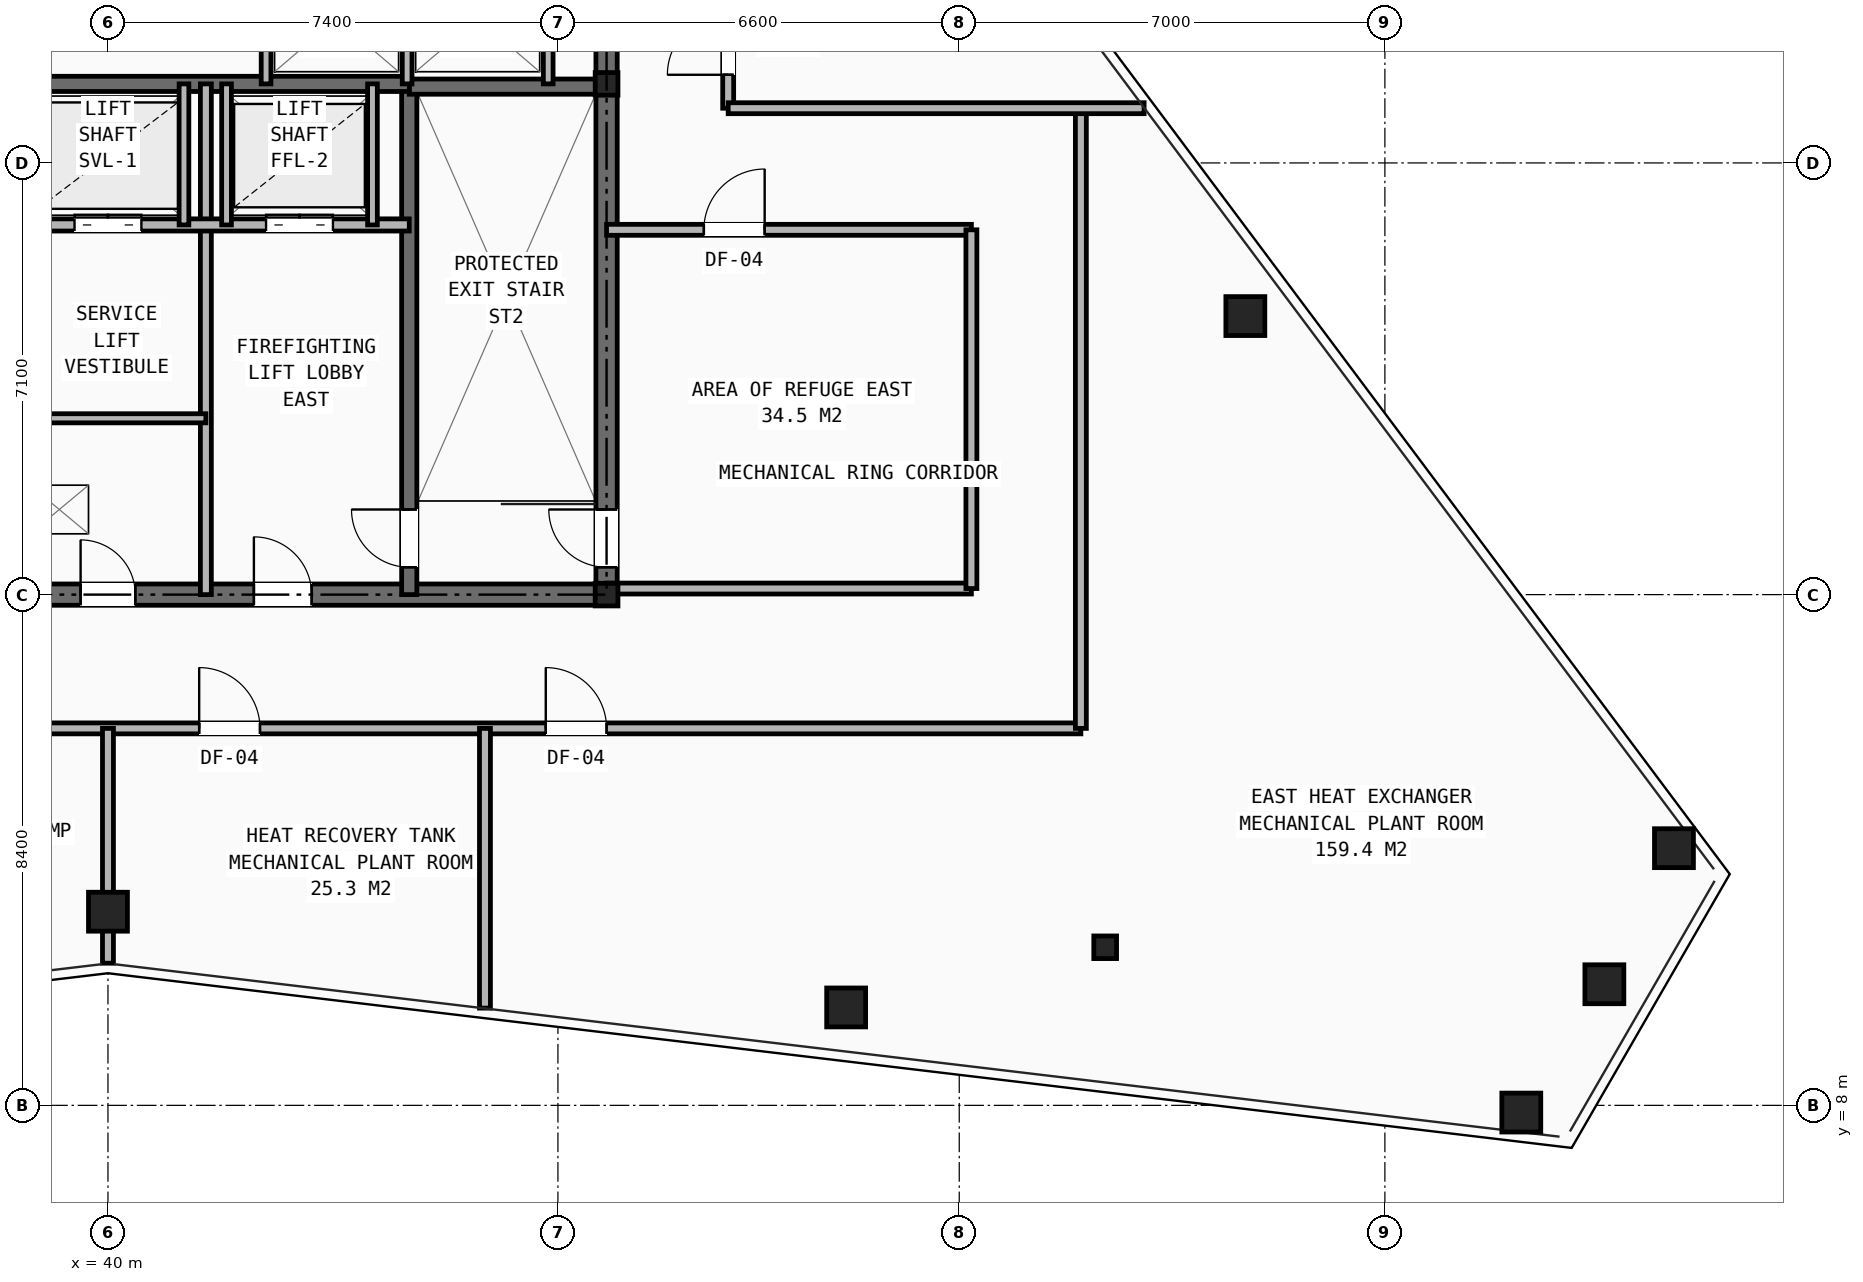
"""IFC4 building model, lengths in metres.
Left out: names, types, materials, properties, quantities, classifications, styles, units other than length and angle.
Written with IfcOpenShell. Run it as: python <this file> out.ifc"""

import sys

from ifc_helpers import new_model, si_unit, direction, frame, frame_2d, origin, origin_2d, place, context, subcontext, project, spatial, rectangle, hollow_rectangle, i_section, extrude, element, fill, save


model = new_model("IFC4")
c1 = context("Model", 3, precision=1e-05, world=origin(), true_north=direction((0.0, 1.0)))
c2 = subcontext(c1, "Body", "Model", "MODEL_VIEW")
j1 = project(units=[si_unit("LENGTHUNIT", "METRE"), si_unit("PLANEANGLEUNIT", "RADIAN")], contexts=[c1])
p1 = place(None, origin())
s1 = spatial("IfcSite", under=j1, at=p1, CompositionType="ELEMENT")
p2 = place(p1, origin())
s2 = spatial("IfcBuilding", under=s1, at=p2, CompositionType="ELEMENT")
p3 = place(p2, frame((0.0, 0.0, 290.0)))
s3 = spatial("IfcBuildingStorey", under=s2, at=p3, CompositionType="ELEMENT", Elevation=290.0)
for number, where, z_axis, x_axis in (
    (1, (48.2, 16.4, 0.0), (0.0, 0.0, 1.0), (1.0, 0.0, 0.0)),
    (2, (48.2, 24.8, 0.0), (0.0, 0.0, 1.0), (1.0, 0.0, 0.0)),
    (3, (56.4, 10.6, 0.0), (0.0, 0.0, 1.0), (1.0, 0.0, 0.0)),
):
    element("IfcColumn", number, at=place(p3, frame(where, z_axis=z_axis, x_axis=x_axis)), inside=s3, PredefinedType="COLUMN", context=c2, shape_type="SweptSolid", body=[
        extrude(i_section(OverallWidth=0.374, OverallDepth=0.372, WebThickness=0.016, FlangeThickness=0.026, at=origin_2d()), origin(), (0.0, 0.0, 1.0), 4.8),
    ])
for number, where, z_axis, x_axis in (
    (4, (40.0, 11.185, 0.0), (0.0, 0.0, 1.0), (1.0, 0.0, 0.0)),
    (5, (52.14, 9.61, 0.0), (0.0, 0.0, 1.0), (1.0, 0.0, 0.0)),
    (6, (63.243, 7.882, 0.0), (0.0, 0.0, 1.0), (1.0, 0.0, 0.0)),
    (7, (64.61, 9.992, 0.0), (0.0, 0.0, 1.0), (1.0, 0.0, 0.0)),
    (8, (65.754, 12.23, 0.0), (0.0, 0.0, 1.0), (1.0, 0.0, 0.0)),
    (9, (58.705, 20.981, 0.0), (0.0, 0.0, 1.0), (1.0, 0.0, 0.0)),
):
    element("IfcColumn", number, at=place(p3, frame(where, z_axis=z_axis, x_axis=x_axis)), inside=s3, PredefinedType="COLUMN", context=c2, shape_type="SweptSolid", body=[
        extrude(hollow_rectangle(XDim=0.64, YDim=0.64, WallThickness=0.045, at=origin_2d()), origin(), (0.0, 0.0, 1.0), 4.8),
    ])
p4 = place(p3, frame((31.8, 16.4, 0.0), z_axis=(0.0, 0.0, 1.0), x_axis=(1.0, 0.0, 0.0)))
e10 = element("IfcWall", 10, at=p4, inside=s3, PredefinedType="SHEAR", context=c2, shape_type="SweptSolid", body=[
    extrude(rectangle(XDim=16.4, YDim=0.35, at=frame_2d((8.2, 0.0))), origin(), (0.0, 0.0, 1.0), 4.54),
])
p5 = place(p4, frame((7.75, 0.0, 0.0)))
e11 = element("IfcOpeningElement", 11, at=p5, cuts=e10, PredefinedType="OPENING", context=c2, shape_type="SweptSolid", body=[
    extrude(rectangle(XDim=0.9, YDim=2.1, at=frame_2d((0.45, 1.05))), frame((0.0, 0.185, 0.0), z_axis=(0.0, -1.0, 0.0), x_axis=(1.0, 0.0, 0.0)), (0.0, 0.0, 1.0), 0.37),
])
p6 = place(p4, frame((4.2, 0.0, 0.0)))
e12 = element("IfcOpeningElement", 12, at=p6, cuts=e10, PredefinedType="OPENING", context=c2, shape_type="SweptSolid", body=[
    extrude(rectangle(XDim=0.95, YDim=2.1, at=frame_2d((0.475, 1.05))), frame((0.0, 0.185, 0.0), z_axis=(0.0, -1.0, 0.0), x_axis=(1.0, 0.0, 0.0)), (0.0, 0.0, 1.0), 0.37),
])
p7 = place(p4, frame((10.6, 0.0, 0.0)))
e13 = element("IfcOpeningElement", 13, at=p7, cuts=e10, PredefinedType="OPENING", context=c2, shape_type="SweptSolid", body=[
    extrude(rectangle(XDim=0.95, YDim=2.1, at=frame_2d((0.475, 1.05))), frame((0.0, 0.185, 0.0), z_axis=(0.0, -1.0, 0.0), x_axis=(1.0, 0.0, 0.0)), (0.0, 0.0, 1.0), 0.37),
])
p8 = place(p3, frame((48.2, 16.4, 0.0), z_axis=(0.0, 0.0, 1.0), x_axis=(0.0, 1.0, 0.0)))
e14 = element("IfcWall", 14, at=p8, inside=s3, PredefinedType="SHEAR", context=c2, shape_type="SweptSolid", body=[
    extrude(rectangle(XDim=14.8, YDim=0.35, at=frame_2d((7.4, 0.0))), origin(), (0.0, 0.0, 1.0), 4.54),
])
p9 = place(p8, frame((11.0, 0.0, 0.0)))
e15 = element("IfcOpeningElement", 15, at=p9, cuts=e14, PredefinedType="OPENING", context=c2, shape_type="SweptSolid", body=[
    extrude(rectangle(XDim=1.1, YDim=2.15, at=frame_2d((0.55, 1.075))), frame((0.0, 0.185, 0.0), z_axis=(0.0, -1.0, 0.0), x_axis=(1.0, 0.0, 0.0)), (0.0, 0.0, 1.0), 0.37),
])
p10 = place(p8, frame((0.45, 0.0, 0.0)))
e16 = element("IfcOpeningElement", 16, at=p10, cuts=e14, PredefinedType="OPENING", context=c2, shape_type="SweptSolid", body=[
    extrude(rectangle(XDim=0.95, YDim=2.1, at=frame_2d((0.475, 1.05))), frame((0.0, 0.185, 0.0), z_axis=(0.0, -1.0, 0.0), x_axis=(1.0, 0.0, 0.0)), (0.0, 0.0, 1.0), 0.37),
])
p11 = place(p3, frame((44.955, 16.4, 0.0), z_axis=(0.0, 0.0, 1.0), x_axis=(0.0, 1.0, 0.0)))
e17 = element("IfcWall", 17, at=p11, inside=s3, PredefinedType="SHEAR", context=c2, shape_type="SweptSolid", body=[
    extrude(rectangle(XDim=8.4, YDim=0.25, at=frame_2d((4.2, 0.0))), origin(), (0.0, 0.0, 1.0), 4.54),
])
p12 = place(p11, frame((0.45, 0.0, 0.0)))
e18 = element("IfcOpeningElement", 18, at=p12, cuts=e17, PredefinedType="OPENING", context=c2, shape_type="SweptSolid", body=[
    extrude(rectangle(XDim=0.95, YDim=2.1, at=frame_2d((0.475, 1.05))), frame((0.0, 0.135, 0.0), z_axis=(0.0, -1.0, 0.0), x_axis=(1.0, 0.0, 0.0)), (0.0, 0.0, 1.0), 0.27),
])
p13 = place(p3, frame((44.955, 24.755, 0.0), z_axis=(0.0, 0.0, 1.0), x_axis=(1.0, 0.0, 0.0)))
e19 = element("IfcWall", 19, at=p13, inside=s3, PredefinedType="SHEAR", context=c2, shape_type="SweptSolid", body=[
    extrude(rectangle(XDim=3.245, YDim=0.25, at=frame_2d((1.623, 0.0))), origin(), (0.0, 0.0, 1.0), 4.54),
])
p14 = place(p3, frame((35.045, 24.8, 0.0), z_axis=(0.0, 0.0, 1.0), x_axis=(1.0, 0.0, 0.0)))
e20 = element("IfcWall", 20, at=p14, inside=s3, PredefinedType="SHEAR", context=c2, shape_type="SweptSolid", body=[
    extrude(rectangle(XDim=9.91, YDim=0.25, at=frame_2d((4.955, 0.0))), origin(), (0.0, 0.0, 1.0), 4.54),
])
p15 = place(p3, frame((41.61, 16.4, 0.0), z_axis=(0.0, 0.0, 1.0), x_axis=(0.0, 1.0, 0.0)))
e21 = element("IfcWall", 21, at=p15, inside=s3, PredefinedType="PARTITIONING", context=c2, shape_type="SweptSolid", body=[
    extrude(rectangle(XDim=8.4, YDim=0.18, at=frame_2d((4.2, 0.0))), origin(), (0.0, 0.0, 1.0), 3.995),
])
p16 = place(p3, frame((35.045, 22.48, 0.0), z_axis=(0.0, 0.0, 1.0), x_axis=(1.0, 0.0, 0.0)))
e22 = element("IfcWall", 22, at=p16, inside=s3, PredefinedType="SOLIDWALL", context=c2, shape_type="SweptSolid", body=[
    extrude(rectangle(XDim=9.91, YDim=0.2, at=frame_2d((4.955, 0.0))), origin(), (0.0, 0.0, 1.0), 4.54),
])
p17 = place(p16, frame((1.255, 0.0, 0.0)))
e23 = element("IfcOpeningElement", 23, at=p17, cuts=e22, PredefinedType="OPENING", context=c2, shape_type="SweptSolid", body=[
    extrude(rectangle(XDim=1.1, YDim=2.15, at=frame_2d((0.55, 1.075))), frame((0.0, 0.11, 0.0), z_axis=(0.0, -1.0, 0.0), x_axis=(1.0, 0.0, 0.0)), (0.0, 0.0, 1.0), 0.22),
])
p18 = place(p16, frame((7.555, 0.0, 0.0)))
e24 = element("IfcOpeningElement", 24, at=p18, cuts=e22, PredefinedType="OPENING", context=c2, shape_type="SweptSolid", body=[
    extrude(rectangle(XDim=1.1, YDim=2.15, at=frame_2d((0.55, 1.075))), frame((0.0, 0.11, 0.0), z_axis=(0.0, -1.0, 0.0), x_axis=(1.0, 0.0, 0.0)), (0.0, 0.0, 1.0), 0.22),
])
p19 = place(p16, frame((4.405, 0.0, 0.0)))
e25 = element("IfcOpeningElement", 25, at=p19, cuts=e22, PredefinedType="OPENING", context=c2, shape_type="SweptSolid", body=[
    extrude(rectangle(XDim=1.1, YDim=2.15, at=frame_2d((0.55, 1.075))), frame((0.0, 0.11, 0.0), z_axis=(0.0, -1.0, 0.0), x_axis=(1.0, 0.0, 0.0)), (0.0, 0.0, 1.0), 0.22),
])
p20 = place(p3, frame((38.39, 19.3, 0.0), z_axis=(0.0, 0.0, 1.0), x_axis=(1.0, 0.0, 0.0)))
e26 = element("IfcWall", 26, at=p20, inside=s3, PredefinedType="PARTITIONING", context=c2, shape_type="SweptSolid", body=[
    extrude(rectangle(XDim=3.22, YDim=0.15, at=frame_2d((1.61, 0.0))), origin(), (0.0, 0.0, 1.0), 4.54),
])
for number, where, z_axis, x_axis in (
    (27, (41.95, 22.48, 0.0), (0.0, 0.0, 1.0), (0.0, 1.0, 0.0)),
    (28, (44.35, 22.48, 0.0), (0.0, 0.0, 1.0), (0.0, 1.0, 0.0)),
    (29, (41.25, 22.48, 0.0), (0.0, 0.0, 1.0), (0.0, 1.0, 0.0)),
):
    element("IfcWall", number, at=place(p3, frame(where, z_axis=z_axis, x_axis=x_axis)), inside=s3, PredefinedType="SOLIDWALL", context=c2, shape_type="SweptSolid", body=[
        extrude(rectangle(XDim=2.32, YDim=0.16, at=frame_2d((1.16, 0.0))), origin(), (0.0, 0.0, 1.0), 4.54),
    ])
for number, where, z_axis, x_axis in (
    (30, (42.6, 24.8, 0.0), (0.0, 0.0, 1.0), (0.0, 1.0, 0.0)),
    (31, (44.92, 24.8, 0.0), (0.0, 0.0, 1.0), (0.0, 1.0, 0.0)),
    (32, (47.24, 24.8, 0.0), (0.0, 0.0, 1.0), (0.0, 1.0, 0.0)),
):
    element("IfcWall", number, at=place(p3, frame(where, z_axis=z_axis, x_axis=x_axis)), inside=s3, PredefinedType="SOLIDWALL", context=c2, shape_type="SweptSolid", body=[
        extrude(rectangle(XDim=2.08, YDim=0.16, at=frame_2d((1.04, 0.0))), origin(), (0.0, 0.0, 1.0), 4.54),
    ])
p21 = place(p3, frame((24.0, 14.2, 0.0), z_axis=(0.0, 0.0, 1.0), x_axis=(1.0, 0.0, 0.0)))
e33 = element("IfcWall", 33, at=p21, inside=s3, PredefinedType="PARTITIONING", context=c2, shape_type="SweptSolid", body=[
    extrude(rectangle(XDim=32.0, YDim=0.18, at=frame_2d((16.0, 0.0))), origin(), (0.0, 0.0, 1.0), 3.582),
])
p22 = place(p21, frame((7.2, 0.0, 0.0)))
e34 = element("IfcOpeningElement", 34, at=p22, cuts=e33, PredefinedType="OPENING", context=c2, shape_type="SweptSolid", body=[
    extrude(rectangle(XDim=1.0, YDim=2.15, at=frame_2d((0.5, 1.075))), frame((0.0, 0.1, 0.0), z_axis=(0.0, -1.0, 0.0), x_axis=(1.0, 0.0, 0.0)), (0.0, 0.0, 1.0), 0.2),
])
p23 = place(p21, frame((11.2, 0.0, 0.0)))
e35 = element("IfcOpeningElement", 35, at=p23, cuts=e33, PredefinedType="OPENING", context=c2, shape_type="SweptSolid", body=[
    extrude(rectangle(XDim=1.0, YDim=2.15, at=frame_2d((0.5, 1.075))), frame((0.0, 0.1, 0.0), z_axis=(0.0, -1.0, 0.0), x_axis=(1.0, 0.0, 0.0)), (0.0, 0.0, 1.0), 0.2),
])
p24 = place(p21, frame((17.5, 0.0, 0.0)))
e36 = element("IfcOpeningElement", 36, at=p24, cuts=e33, PredefinedType="OPENING", context=c2, shape_type="SweptSolid", body=[
    extrude(rectangle(XDim=1.0, YDim=2.15, at=frame_2d((0.5, 1.075))), frame((0.0, 0.1, 0.0), z_axis=(0.0, -1.0, 0.0), x_axis=(1.0, 0.0, 0.0)), (0.0, 0.0, 1.0), 0.2),
])
p25 = place(p21, frame((23.2, 0.0, 0.0)))
e37 = element("IfcOpeningElement", 37, at=p25, cuts=e33, PredefinedType="OPENING", context=c2, shape_type="SweptSolid", body=[
    extrude(rectangle(XDim=1.0, YDim=2.15, at=frame_2d((0.5, 1.075))), frame((0.0, 0.1, 0.0), z_axis=(0.0, -1.0, 0.0), x_axis=(1.0, 0.0, 0.0)), (0.0, 0.0, 1.0), 0.2),
])
p26 = place(p3, frame((50.2, 24.4, 0.0), z_axis=(0.0, 0.0, 1.0), x_axis=(0.0, 1.0, 0.0)))
e38 = element("IfcWall", 38, at=p26, inside=s3, PredefinedType="PARTITIONING", context=c2, shape_type="SweptSolid", body=[
    extrude(rectangle(XDim=8.6, YDim=0.18, at=frame_2d((4.3, 0.0))), origin(), (0.0, 0.0, 1.0), 3.582),
])
p27 = place(p26, frame((0.55, 0.0, 0.0)))
e39 = element("IfcOpeningElement", 39, at=p27, cuts=e38, PredefinedType="OPENING", context=c2, shape_type="SweptSolid", body=[
    extrude(rectangle(XDim=1.0, YDim=2.15, at=frame_2d((0.5, 1.075))), frame((0.0, 0.1, 0.0), z_axis=(0.0, -1.0, 0.0), x_axis=(1.0, 0.0, 0.0)), (0.0, 0.0, 1.0), 0.2),
])
p28 = place(p3, frame((56.0, 14.2, 0.0), z_axis=(0.0, 0.0, 1.0), x_axis=(0.0, 1.0, 0.0)))
e40 = element("IfcWall", 40, at=p28, inside=s3, PredefinedType="PARTITIONING", context=c2, shape_type="SweptSolid", body=[
    extrude(rectangle(XDim=10.2, YDim=0.18, at=frame_2d((5.1, 0.0))), origin(), (0.0, 0.0, 1.0), 3.918),
])
p29 = place(p3, frame((48.2, 16.5, 0.0), z_axis=(0.0, 0.0, 1.0), x_axis=(1.0, 0.0, 0.0)))
e41 = element("IfcWall", 41, at=p29, inside=s3, PredefinedType="PARTITIONING", context=c2, shape_type="SweptSolid", body=[
    extrude(rectangle(XDim=6.0, YDim=0.18, at=frame_2d((3.0, 0.0))), origin(), (0.0, 0.0, 1.0), 3.995),
])
p30 = place(p3, frame((48.2, 22.4, 0.0), z_axis=(0.0, 0.0, 1.0), x_axis=(1.0, 0.0, 0.0)))
e42 = element("IfcWall", 42, at=p30, inside=s3, PredefinedType="PARTITIONING", context=c2, shape_type="SweptSolid", body=[
    extrude(rectangle(XDim=6.0, YDim=0.18, at=frame_2d((3.0, 0.0))), origin(), (0.0, 0.0, 1.0), 3.995),
])
p31 = place(p30, frame((1.6, 0.0, 0.0)))
e43 = element("IfcOpeningElement", 43, at=p31, cuts=e42, PredefinedType="OPENING", context=c2, shape_type="SweptSolid", body=[
    extrude(rectangle(XDim=1.0, YDim=2.15, at=frame_2d((0.5, 1.075))), frame((0.0, 0.1, 0.0), z_axis=(0.0, -1.0, 0.0), x_axis=(1.0, 0.0, 0.0)), (0.0, 0.0, 1.0), 0.2),
])
p32 = place(p3, frame((54.2, 16.5, 0.0), z_axis=(0.0, 0.0, 1.0), x_axis=(0.0, 1.0, 0.0)))
e44 = element("IfcWall", 44, at=p32, inside=s3, PredefinedType="PARTITIONING", context=c2, shape_type="SweptSolid", body=[
    extrude(rectangle(XDim=5.9, YDim=0.18, at=frame_2d((2.95, 0.0))), origin(), (0.0, 0.0, 1.0), 4.123),
])
p33 = place(p3, frame((50.2, 24.4, 0.0), z_axis=(0.0, 0.0, 1.0), x_axis=(1.0, 0.0, 0.0)))
e45 = element("IfcWall", 45, at=p33, inside=s3, PredefinedType="PARTITIONING", context=c2, shape_type="SweptSolid", body=[
    extrude(rectangle(XDim=6.84, YDim=0.18, at=frame_2d((3.42, 0.0))), origin(), (0.0, 0.0, 1.0), 3.918),
])
p34 = place(p3, frame((40.0, 10.338, 0.0), z_axis=(0.0, 0.0, 1.0), x_axis=(0.0, 1.0, 0.0)))
e46 = element("IfcWall", 46, at=p34, inside=s3, PredefinedType="PARTITIONING", context=c2, shape_type="SweptSolid", body=[
    extrude(rectangle(XDim=3.862, YDim=0.18, at=frame_2d((1.931, 0.0))), origin(), (0.0, 0.0, 1.0), 3.582),
])
p35 = place(p3, frame((46.2, 9.599, 0.0), z_axis=(0.0, 0.0, 1.0), x_axis=(0.0, 1.0, 0.0)))
e47 = element("IfcWall", 47, at=p35, inside=s3, PredefinedType="PARTITIONING", context=c2, shape_type="SweptSolid", body=[
    extrude(rectangle(XDim=4.601, YDim=0.18, at=frame_2d((2.3, 0.0))), origin(), (0.0, 0.0, 1.0), 3.918),
])
p36 = place(p5, origin())
e48 = element("IfcDoor", 48, at=p36, inside=s3, OperationType="SINGLE_SWING_LEFT", PredefinedType="DOOR", context=c2, shape_type="SweptSolid", body=[
    extrude(rectangle(XDim=0.9, YDim=2.1, at=frame_2d((0.45, 1.05))), frame((0.0, 0.025, 0.0), z_axis=(0.0, -1.0, 0.0), x_axis=(1.0, 0.0, 0.0)), (0.0, 0.0, 1.0), 0.05),
])
fill(e11, e48)
p37 = place(p12, origin())
e49 = element("IfcDoor", 49, at=p37, inside=s3, OperationType="SINGLE_SWING_RIGHT", PredefinedType="DOOR", context=c2, shape_type="SweptSolid", body=[
    extrude(rectangle(XDim=0.95, YDim=2.1, at=frame_2d((0.475, 1.05))), frame((0.0, 0.025, 0.0), z_axis=(0.0, -1.0, 0.0), x_axis=(1.0, 0.0, 0.0)), (0.0, 0.0, 1.0), 0.05),
])
fill(e18, e49)
p38 = place(p7, origin())
e50 = element("IfcDoor", 50, at=p38, inside=s3, OperationType="SINGLE_SWING_LEFT", PredefinedType="DOOR", context=c2, shape_type="SweptSolid", body=[
    extrude(rectangle(XDim=0.95, YDim=2.1, at=frame_2d((0.475, 1.05))), frame((0.0, 0.025, 0.0), z_axis=(0.0, -1.0, 0.0), x_axis=(1.0, 0.0, 0.0)), (0.0, 0.0, 1.0), 0.05),
])
fill(e13, e50)
p39 = place(p18, origin())
e51 = element("IfcDoor", 51, at=p39, inside=s3, OperationType="DOUBLE_DOOR_SLIDING", PredefinedType="DOOR", context=c2, shape_type="SweptSolid", body=[
    extrude(rectangle(XDim=1.1, YDim=2.15, at=frame_2d((0.55, 1.075))), frame((0.0, 0.025, 0.0), z_axis=(0.0, -1.0, 0.0), x_axis=(1.0, 0.0, 0.0)), (0.0, 0.0, 1.0), 0.05),
])
fill(e24, e51)
p40 = place(p19, origin())
e52 = element("IfcDoor", 52, at=p40, inside=s3, OperationType="DOUBLE_DOOR_SLIDING", PredefinedType="DOOR", context=c2, shape_type="SweptSolid", body=[
    extrude(rectangle(XDim=1.1, YDim=2.15, at=frame_2d((0.55, 1.075))), frame((0.0, 0.025, 0.0), z_axis=(0.0, -1.0, 0.0), x_axis=(1.0, 0.0, 0.0)), (0.0, 0.0, 1.0), 0.05),
])
fill(e25, e52)
p41 = place(p10, origin())
e53 = element("IfcDoor", 53, at=p41, inside=s3, OperationType="SINGLE_SWING_RIGHT", PredefinedType="DOOR", context=c2, shape_type="SweptSolid", body=[
    extrude(rectangle(XDim=0.95, YDim=2.1, at=frame_2d((0.475, 1.05))), frame((0.0, 0.025, 0.0), z_axis=(0.0, -1.0, 0.0), x_axis=(1.0, 0.0, 0.0)), (0.0, 0.0, 1.0), 0.05),
])
fill(e16, e53)
p42 = place(p31, origin())
e54 = element("IfcDoor", 54, at=p42, inside=s3, OperationType="SINGLE_SWING_RIGHT", PredefinedType="DOOR", context=c2, shape_type="SweptSolid", body=[
    extrude(rectangle(XDim=1.0, YDim=2.15, at=frame_2d((0.5, 1.075))), frame((0.0, 0.025, 0.0), z_axis=(0.0, -1.0, 0.0), x_axis=(1.0, 0.0, 0.0)), (0.0, 0.0, 1.0), 0.05),
])
fill(e43, e54)
p43 = place(p24, origin())
e55 = element("IfcDoor", 55, at=p43, inside=s3, OperationType="SINGLE_SWING_LEFT", PredefinedType="DOOR", context=c2, shape_type="SweptSolid", body=[
    extrude(rectangle(XDim=1.0, YDim=2.15, at=frame_2d((0.5, 1.075))), frame((0.0, 0.025, 0.0), z_axis=(0.0, -1.0, 0.0), x_axis=(1.0, 0.0, 0.0)), (0.0, 0.0, 1.0), 0.05),
])
fill(e36, e55)
p44 = place(p25, origin())
e56 = element("IfcDoor", 56, at=p44, inside=s3, OperationType="SINGLE_SWING_LEFT", PredefinedType="DOOR", context=c2, shape_type="SweptSolid", body=[
    extrude(rectangle(XDim=1.0, YDim=2.15, at=frame_2d((0.5, 1.075))), frame((0.0, 0.025, 0.0), z_axis=(0.0, -1.0, 0.0), x_axis=(1.0, 0.0, 0.0)), (0.0, 0.0, 1.0), 0.05),
])
fill(e37, e56)
p45 = place(p27, origin())
e57 = element("IfcDoor", 57, at=p45, inside=s3, OperationType="SINGLE_SWING_LEFT", PredefinedType="DOOR", context=c2, shape_type="SweptSolid", body=[
    extrude(rectangle(XDim=1.0, YDim=2.15, at=frame_2d((0.5, 1.075))), frame((0.0, 0.025, 0.0), z_axis=(0.0, -1.0, 0.0), x_axis=(1.0, 0.0, 0.0)), (0.0, 0.0, 1.0), 0.05),
])
fill(e39, e57)
save(model, sys.argv[1])
